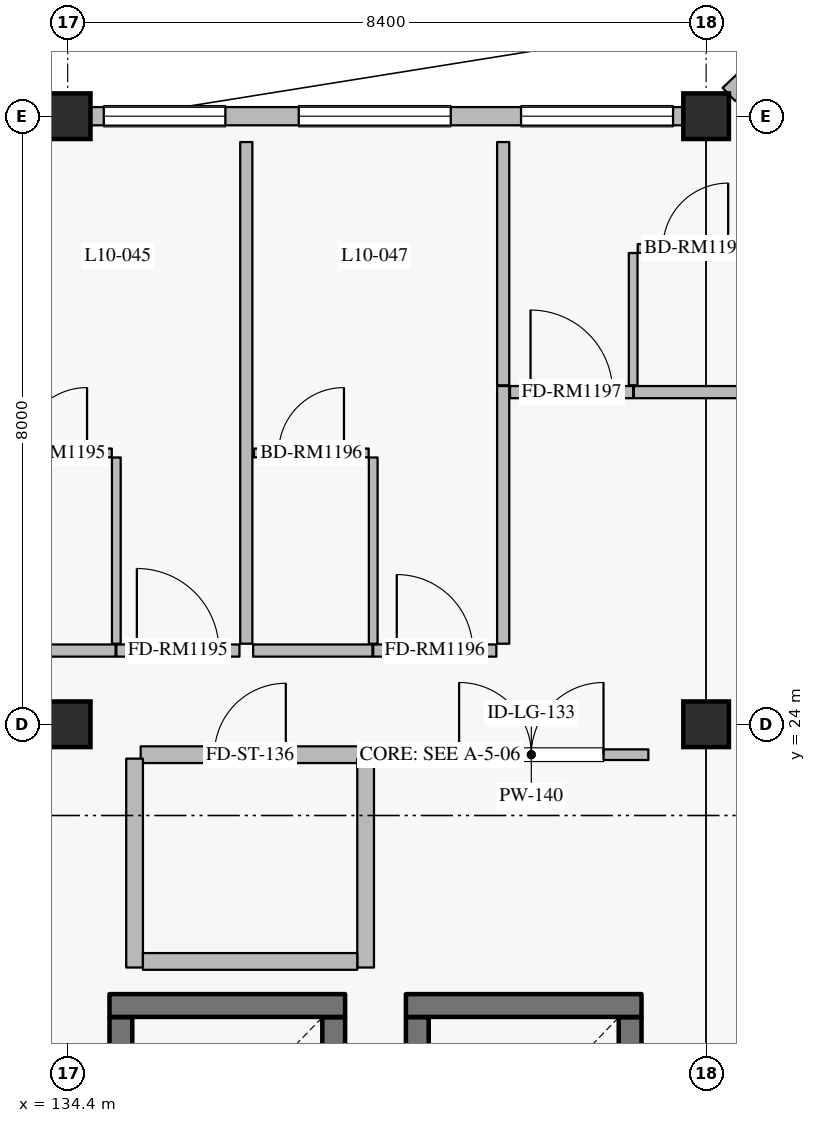
"""IFC4 building model, lengths in metres.
Left out: names, types, materials, properties, quantities, classifications, styles, units other than length and angle.
Written with IfcOpenShell. Run it as: python <this file> out.ifc"""

import sys

from ifc_helpers import new_model, si_unit, direction, frame, frame_2d, origin, origin_2d, place, context, subcontext, project, spatial, rectangle, extrude, element, fill, save


model = new_model("IFC4")
c1 = context("Model", 3, precision=1e-05, world=origin(), true_north=direction((0.0, 1.0)))
c2 = subcontext(c1, "Body", "Model", "MODEL_VIEW")
j1 = project(units=[si_unit("LENGTHUNIT", "METRE"), si_unit("PLANEANGLEUNIT", "RADIAN")], contexts=[c1])
p1 = place(None, origin())
s1 = spatial("IfcSite", under=j1, at=p1, CompositionType="ELEMENT")
p2 = place(p1, origin())
s2 = spatial("IfcBuilding", under=s1, at=p2, CompositionType="ELEMENT")
p3 = place(p2, frame((0.0, 0.0, 43.2)))
s3 = spatial("IfcBuildingStorey", under=s2, at=p3, CompositionType="ELEMENT", Elevation=43.2)
for number, where, z_axis, x_axis in (
    (1, (134.4, 32.0, 0.0), (0.0, 0.0, 1.0), (1.0, 0.0, 0.0)),
    (2, (142.8, 32.0, 0.0), (0.0, 0.0, 1.0), (1.0, 0.0, 0.0)),
    (3, (134.4, 24.0, 0.0), (0.0, 0.0, 1.0), (1.0, 0.0, 0.0)),
    (4, (142.8, 24.0, 0.0), (0.0, 0.0, 1.0), (1.0, 0.0, 0.0)),
):
    element("IfcColumn", number, at=place(p3, frame(where, z_axis=z_axis, x_axis=x_axis)), inside=s3, PredefinedType="COLUMN", context=c2, shape_type="SweptSolid", body=[
        extrude(rectangle(XDim=0.6, YDim=0.6, at=origin_2d()), origin(), (0.0, 0.0, 1.0), 4.2),
    ])
p4 = place(p3, frame((134.7, 32.0, 0.0), z_axis=(0.0, 0.0, 1.0), x_axis=(1.0, 0.0, 0.0)))
e5 = element("IfcWall", 5, at=p4, inside=s3, PredefinedType="SOLIDWALL", context=c2, shape_type="SweptSolid", body=[
    extrude(rectangle(XDim=7.8, YDim=0.24, at=frame_2d((3.9, 0.0))), origin(), (0.0, 0.0, 1.0), 3.54),
])
p5 = place(p4, frame((0.175, 0.0, 0.8)))
e6 = element("IfcOpeningElement", 6, at=p5, cuts=e5, PredefinedType="OPENING", context=c2, shape_type="SweptSolid", body=[
    extrude(rectangle(XDim=1.6, YDim=1.6, at=frame_2d((0.8, 0.8))), frame((0.0, 0.13, 0.0), z_axis=(0.0, -1.0, 0.0), x_axis=(1.0, 0.0, 0.0)), (0.0, 0.0, 1.0), 0.26),
])
p6 = place(p4, frame((2.74, 0.0, 0.8)))
e7 = element("IfcOpeningElement", 7, at=p6, cuts=e5, PredefinedType="OPENING", context=c2, shape_type="SweptSolid", body=[
    extrude(rectangle(XDim=2.0, YDim=1.75, at=frame_2d((1.0, 0.875))), frame((0.0, 0.13, 0.0), z_axis=(0.0, -1.0, 0.0), x_axis=(1.0, 0.0, 0.0)), (0.0, 0.0, 1.0), 0.26),
])
p7 = place(p4, frame((5.665, 0.0, 0.8)))
e8 = element("IfcOpeningElement", 8, at=p7, cuts=e5, PredefinedType="OPENING", context=c2, shape_type="SweptSolid", body=[
    extrude(rectangle(XDim=2.0, YDim=1.75, at=frame_2d((1.0, 0.875))), frame((0.0, 0.13, 0.0), z_axis=(0.0, -1.0, 0.0), x_axis=(1.0, 0.0, 0.0)), (0.0, 0.0, 1.0), 0.26),
])
p8 = place(p3, frame((143.1, 32.286, 0.0), z_axis=(0.0, 0.0, 1.0), x_axis=(0.724145477467, 0.689647248573, 0.0)))
e9 = element("IfcWall", 9, at=p8, inside=s3, PredefinedType="SOLIDWALL", context=c2, shape_type="SweptSolid", body=[
    extrude(rectangle(XDim=10.771, YDim=0.24, at=frame_2d((5.385, 0.0))), origin(), (0.0, 0.0, 1.0), 3.54),
])
p9 = place(p8, frame((1.914, 0.0, 0.8)))
e10 = element("IfcOpeningElement", 10, at=p9, cuts=e9, PredefinedType="OPENING", context=c2, shape_type="SweptSolid", body=[
    extrude(rectangle(XDim=2.0, YDim=1.75, at=frame_2d((1.0, 0.875))), frame((0.0, 0.13, 0.0), z_axis=(0.0, -1.0, 0.0), x_axis=(1.0, 0.0, 0.0)), (0.0, 0.0, 1.0), 0.26),
])
p10 = place(p8, frame((6.581, 0.0, 0.8)))
e11 = element("IfcOpeningElement", 11, at=p10, cuts=e9, PredefinedType="OPENING", context=c2, shape_type="SweptSolid", body=[
    extrude(rectangle(XDim=2.0, YDim=1.75, at=frame_2d((1.0, 0.875))), frame((0.0, 0.13, 0.0), z_axis=(0.0, -1.0, 0.0), x_axis=(1.0, 0.0, 0.0)), (0.0, 0.0, 1.0), 0.26),
])
p11 = place(p3, frame((137.9, 17.555, 0.0), z_axis=(0.0, 0.0, 1.0), x_axis=(0.0, 1.0, 0.0)))
e12 = element("IfcWall", 12, at=p11, inside=s3, PredefinedType="SHEAR", context=c2, shape_type="SweptSolid", body=[
    extrude(rectangle(XDim=2.59, YDim=0.3, at=frame_2d((1.295, 0.0))), origin(), (0.0, 0.0, 1.0), 3.935),
])
p12 = place(p3, frame((138.05, 20.3, 0.0), z_axis=(0.0, 0.0, 1.0), x_axis=(-1.0, 0.0, 0.0)))
e13 = element("IfcWall", 13, at=p12, inside=s3, PredefinedType="SHEAR", context=c2, shape_type="SweptSolid", body=[
    extrude(rectangle(XDim=3.1, YDim=0.3, at=frame_2d((1.55, 0.0))), origin(), (0.0, 0.0, 1.0), 3.935),
])
for number, where, z_axis, x_axis in (
    (14, (135.1, 20.145, 0.0), (0.0, 0.0, 1.0), (0.0, -1.0, 0.0)),
    (15, (141.8, 17.555, 0.0), (0.0, 0.0, 1.0), (0.0, 1.0, 0.0)),
):
    element("IfcWall", number, at=place(p3, frame(where, z_axis=z_axis, x_axis=x_axis)), inside=s3, PredefinedType="SHEAR", context=c2, shape_type="SweptSolid", body=[
        extrude(rectangle(XDim=2.59, YDim=0.3, at=frame_2d((1.295, 0.0))), origin(), (0.0, 0.0, 1.0), 3.935),
    ])
p13 = place(p3, frame((141.95, 20.3, 0.0), z_axis=(0.0, 0.0, 1.0), x_axis=(-1.0, 0.0, 0.0)))
e16 = element("IfcWall", 16, at=p13, inside=s3, PredefinedType="SHEAR", context=c2, shape_type="SweptSolid", body=[
    extrude(rectangle(XDim=3.1, YDim=0.3, at=frame_2d((1.55, 0.0))), origin(), (0.0, 0.0, 1.0), 3.935),
])
p14 = place(p3, frame((139.0, 20.145, 0.0), z_axis=(0.0, 0.0, 1.0), x_axis=(0.0, -1.0, 0.0)))
e17 = element("IfcWall", 17, at=p14, inside=s3, PredefinedType="SHEAR", context=c2, shape_type="SweptSolid", body=[
    extrude(rectangle(XDim=2.59, YDim=0.3, at=frame_2d((1.295, 0.0))), origin(), (0.0, 0.0, 1.0), 3.935),
])
p15 = place(p3, frame((133.46, 24.97, 0.0), z_axis=(0.0, 0.0, 1.0), x_axis=(1.0, 0.0, 0.0)))
e18 = element("IfcWall", 18, at=p15, inside=s3, PredefinedType="PARTITIONING", context=c2, shape_type="SweptSolid", body=[
    extrude(rectangle(XDim=1.57, YDim=0.16, at=frame_2d((0.785, 0.0))), origin(), (0.0, 0.0, 1.0), 3.935),
])
p16 = place(p3, frame((135.04, 24.97, 0.0), z_axis=(0.0, 0.0, 1.0), x_axis=(1.0, 0.0, 0.0)))
e19 = element("IfcWall", 19, at=p16, inside=s3, PredefinedType="PARTITIONING", context=c2, shape_type="SweptSolid", body=[
    extrude(rectangle(XDim=1.62, YDim=0.16, at=frame_2d((0.81, 0.0))), origin(), (0.0, 0.0, 1.0), 3.935),
])
p17 = place(p16, frame((0.27, 0.0, 0.0)))
e20 = element("IfcOpeningElement", 20, at=p17, cuts=e19, PredefinedType="OPENING", context=c2, shape_type="SweptSolid", body=[
    extrude(rectangle(XDim=1.08, YDim=2.3, at=frame_2d((0.54, 1.15))), frame((0.0, 0.09, 0.0), z_axis=(0.0, -1.0, 0.0), x_axis=(1.0, 0.0, 0.0)), (0.0, 0.0, 1.0), 0.18),
])
p18 = place(p3, frame((135.04, 25.06, 0.0), z_axis=(0.0, 0.0, 1.0), x_axis=(0.0, 1.0, 0.0)))
e21 = element("IfcWall", 21, at=p18, inside=s3, PredefinedType="PARTITIONING", context=c2, shape_type="SweptSolid", body=[
    extrude(rectangle(XDim=2.45, YDim=0.115, at=frame_2d((1.225, 0.0))), origin(), (0.0, 0.0, 1.0), 3.935),
])
p19 = place(p3, frame((133.47, 27.57, 0.0), z_axis=(0.0, 0.0, 1.0), x_axis=(1.0, 0.0, 0.0)))
e22 = element("IfcWall", 22, at=p19, inside=s3, PredefinedType="PARTITIONING", context=c2, shape_type="SweptSolid", body=[
    extrude(rectangle(XDim=1.51, YDim=0.115, at=frame_2d((0.755, 0.0))), origin(), (0.0, 0.0, 1.0), 3.935),
])
p20 = place(p19, frame((0.325, 0.0, 0.0)))
e23 = element("IfcOpeningElement", 23, at=p20, cuts=e22, PredefinedType="OPENING", context=c2, shape_type="SweptSolid", body=[
    extrude(rectangle(XDim=0.86, YDim=2.12, at=frame_2d((0.43, 1.06))), frame((0.0, 0.067, 0.0), z_axis=(0.0, -1.0, 0.0), x_axis=(1.0, 0.0, 0.0)), (0.0, 0.0, 1.0), 0.135),
])
p21 = place(p3, frame((136.84, 24.97, 0.0), z_axis=(0.0, 0.0, 1.0), x_axis=(1.0, 0.0, 0.0)))
e24 = element("IfcWall", 24, at=p21, inside=s3, PredefinedType="PARTITIONING", context=c2, shape_type="SweptSolid", body=[
    extrude(rectangle(XDim=1.57, YDim=0.16, at=frame_2d((0.785, 0.0))), origin(), (0.0, 0.0, 1.0), 3.935),
])
p22 = place(p3, frame((138.42, 24.97, 0.0), z_axis=(0.0, 0.0, 1.0), x_axis=(1.0, 0.0, 0.0)))
e25 = element("IfcWall", 25, at=p22, inside=s3, PredefinedType="PARTITIONING", context=c2, shape_type="SweptSolid", body=[
    extrude(rectangle(XDim=1.62, YDim=0.16, at=frame_2d((0.81, 0.0))), origin(), (0.0, 0.0, 1.0), 3.935),
])
p23 = place(p22, frame((0.31, 0.0, 0.0)))
e26 = element("IfcOpeningElement", 26, at=p23, cuts=e25, PredefinedType="OPENING", context=c2, shape_type="SweptSolid", body=[
    extrude(rectangle(XDim=1.0, YDim=2.25, at=frame_2d((0.5, 1.125))), frame((0.0, 0.09, 0.0), z_axis=(0.0, -1.0, 0.0), x_axis=(1.0, 0.0, 0.0)), (0.0, 0.0, 1.0), 0.18),
])
p24 = place(p3, frame((138.42, 25.06, 0.0), z_axis=(0.0, 0.0, 1.0), x_axis=(0.0, 1.0, 0.0)))
e27 = element("IfcWall", 27, at=p24, inside=s3, PredefinedType="PARTITIONING", context=c2, shape_type="SweptSolid", body=[
    extrude(rectangle(XDim=2.45, YDim=0.115, at=frame_2d((1.225, 0.0))), origin(), (0.0, 0.0, 1.0), 3.935),
])
p25 = place(p3, frame((136.85, 27.57, 0.0), z_axis=(0.0, 0.0, 1.0), x_axis=(1.0, 0.0, 0.0)))
e28 = element("IfcWall", 28, at=p25, inside=s3, PredefinedType="PARTITIONING", context=c2, shape_type="SweptSolid", body=[
    extrude(rectangle(XDim=1.51, YDim=0.115, at=frame_2d((0.755, 0.0))), origin(), (0.0, 0.0, 1.0), 3.935),
])
p26 = place(p25, frame((0.325, 0.0, 0.0)))
e29 = element("IfcOpeningElement", 29, at=p26, cuts=e28, PredefinedType="OPENING", context=c2, shape_type="SweptSolid", body=[
    extrude(rectangle(XDim=0.86, YDim=2.12, at=frame_2d((0.43, 1.06))), frame((0.0, 0.067, 0.0), z_axis=(0.0, -1.0, 0.0), x_axis=(1.0, 0.0, 0.0)), (0.0, 0.0, 1.0), 0.135),
])
p27 = place(p3, frame((136.75, 25.06, 0.0), z_axis=(0.0, 0.0, 1.0), x_axis=(0.0, 1.0, 0.0)))
e30 = element("IfcWall", 30, at=p27, inside=s3, PredefinedType="PARTITIONING", context=c2, shape_type="SweptSolid", body=[
    extrude(rectangle(XDim=6.6, YDim=0.16, at=frame_2d((3.3, 0.0))), origin(), (0.0, 0.0, 1.0), 3.935),
])
p28 = place(p3, frame((140.13, 25.06, 0.0), z_axis=(0.0, 0.0, 1.0), x_axis=(0.0, 1.0, 0.0)))
e31 = element("IfcWall", 31, at=p28, inside=s3, PredefinedType="PARTITIONING", context=c2, shape_type="SweptSolid", body=[
    extrude(rectangle(XDim=3.39, YDim=0.16, at=frame_2d((1.695, 0.0))), origin(), (0.0, 0.0, 1.0), 3.935),
])
p29 = place(p3, frame((140.22, 28.37, 0.0), z_axis=(0.0, 0.0, 1.0), x_axis=(1.0, 0.0, 0.0)))
e32 = element("IfcWall", 32, at=p29, inside=s3, PredefinedType="PARTITIONING", context=c2, shape_type="SweptSolid", body=[
    extrude(rectangle(XDim=1.62, YDim=0.16, at=frame_2d((0.81, 0.0))), origin(), (0.0, 0.0, 1.0), 3.935),
])
p30 = place(p29, frame((0.27, 0.0, 0.0)))
e33 = element("IfcOpeningElement", 33, at=p30, cuts=e32, PredefinedType="OPENING", context=c2, shape_type="SweptSolid", body=[
    extrude(rectangle(XDim=1.08, YDim=2.3, at=frame_2d((0.54, 1.15))), frame((0.0, 0.09, 0.0), z_axis=(0.0, -1.0, 0.0), x_axis=(1.0, 0.0, 0.0)), (0.0, 0.0, 1.0), 0.18),
])
p31 = place(p3, frame((141.85, 28.37, 0.0), z_axis=(0.0, 0.0, 1.0), x_axis=(1.0, 0.0, 0.0)))
e34 = element("IfcWall", 34, at=p31, inside=s3, PredefinedType="PARTITIONING", context=c2, shape_type="SweptSolid", body=[
    extrude(rectangle(XDim=1.58, YDim=0.16, at=frame_2d((0.79, 0.0))), origin(), (0.0, 0.0, 1.0), 3.935),
])
p32 = place(p3, frame((141.84, 28.46, 0.0), z_axis=(0.0, 0.0, 1.0), x_axis=(0.0, 1.0, 0.0)))
e35 = element("IfcWall", 35, at=p32, inside=s3, PredefinedType="PARTITIONING", context=c2, shape_type="SweptSolid", body=[
    extrude(rectangle(XDim=1.74, YDim=0.115, at=frame_2d((0.87, 0.0))), origin(), (0.0, 0.0, 1.0), 3.935),
])
p33 = place(p3, frame((141.9, 30.26, 0.0), z_axis=(0.0, 0.0, 1.0), x_axis=(1.0, 0.0, 0.0)))
e36 = element("IfcWall", 36, at=p33, inside=s3, PredefinedType="PARTITIONING", context=c2, shape_type="SweptSolid", body=[
    extrude(rectangle(XDim=1.52, YDim=0.115, at=frame_2d((0.76, 0.0))), origin(), (0.0, 0.0, 1.0), 3.935),
])
p34 = place(p33, frame((0.33, 0.0, 0.0)))
e37 = element("IfcOpeningElement", 37, at=p34, cuts=e36, PredefinedType="OPENING", context=c2, shape_type="SweptSolid", body=[
    extrude(rectangle(XDim=0.86, YDim=2.12, at=frame_2d((0.43, 1.06))), frame((0.0, 0.067, 0.0), z_axis=(0.0, -1.0, 0.0), x_axis=(1.0, 0.0, 0.0)), (0.0, 0.0, 1.0), 0.135),
])
p35 = place(p3, frame((140.13, 28.46, 0.0), z_axis=(0.0, 0.0, 1.0), x_axis=(0.0, 1.0, 0.0)))
e38 = element("IfcWall", 38, at=p35, inside=s3, PredefinedType="PARTITIONING", context=c2, shape_type="SweptSolid", body=[
    extrude(rectangle(XDim=3.2, YDim=0.16, at=frame_2d((1.6, 0.0))), origin(), (0.0, 0.0, 1.0), 3.935),
])
p36 = place(p3, frame((138.96, 23.6, 0.0), z_axis=(0.0, 0.0, 1.0), x_axis=(1.0, 0.0, 0.0)))
e39 = element("IfcWall", 39, at=p36, inside=s3, PredefinedType="PARTITIONING", context=c2, shape_type="SweptSolid", body=[
    extrude(rectangle(XDim=3.08, YDim=0.14, at=frame_2d((1.54, 0.0))), origin(), (0.0, 0.0, 1.0), 3.935),
])
p37 = place(p36, frame((0.59, 0.0, 0.0)))
e40 = element("IfcOpeningElement", 40, at=p37, cuts=e39, PredefinedType="OPENING", context=c2, shape_type="SweptSolid", body=[
    extrude(rectangle(XDim=1.9, YDim=2.4, at=frame_2d((0.95, 1.2))), frame((0.0, 0.08, 0.0), z_axis=(0.0, -1.0, 0.0), x_axis=(1.0, 0.0, 0.0)), (0.0, 0.0, 1.0), 0.16),
])
p38 = place(p3, frame((135.36, 23.6, 0.0), z_axis=(0.0, 0.0, 1.0), x_axis=(1.0, 0.0, 0.0)))
e41 = element("IfcWall", 41, at=p38, inside=s3, PredefinedType="PARTITIONING", context=c2, shape_type="SweptSolid", body=[
    extrude(rectangle(XDim=2.88, YDim=0.22, at=frame_2d((1.44, 0.0))), origin(), (0.0, 0.0, 1.0), 3.935),
])
p39 = place(p38, frame((0.97, 0.0, 0.0)))
e42 = element("IfcOpeningElement", 42, at=p39, cuts=e41, PredefinedType="OPENING", context=c2, shape_type="SweptSolid", body=[
    extrude(rectangle(XDim=0.94, YDim=2.15, at=frame_2d((0.47, 1.075))), frame((0.0, 0.12, 0.0), z_axis=(0.0, -1.0, 0.0), x_axis=(1.0, 0.0, 0.0)), (0.0, 0.0, 1.0), 0.24),
])
for number, where, z_axis, x_axis in (
    (43, (135.28, 20.8, 0.0), (0.0, 0.0, 1.0), (0.0, 1.0, 0.0)),
    (44, (138.32, 20.8, 0.0), (0.0, 0.0, 1.0), (0.0, 1.0, 0.0)),
):
    element("IfcWall", number, at=place(p3, frame(where, z_axis=z_axis, x_axis=x_axis)), inside=s3, PredefinedType="PARTITIONING", context=c2, shape_type="SweptSolid", body=[
        extrude(rectangle(XDim=2.748, YDim=0.22, at=frame_2d((1.374, 0.0))), origin(), (0.0, 0.0, 1.0), 3.935),
    ])
p40 = place(p3, frame((135.39, 20.88, 0.0), z_axis=(0.0, 0.0, 1.0), x_axis=(1.0, 0.0, 0.0)))
e45 = element("IfcWall", 45, at=p40, inside=s3, PredefinedType="PARTITIONING", context=c2, shape_type="SweptSolid", body=[
    extrude(rectangle(XDim=2.82, YDim=0.22, at=frame_2d((1.41, 0.0))), origin(), (0.0, 0.0, 1.0), 3.935),
])
p41 = place(p5, origin())
e46 = element("IfcWindow", 46, at=p41, inside=s3, PartitioningType="SINGLE_PANEL", PredefinedType="WINDOW", context=c2, shape_type="SweptSolid", body=[
    extrude(rectangle(XDim=1.6, YDim=1.6, at=frame_2d((0.8, 0.8))), frame((0.0, 0.03, 0.0), z_axis=(0.0, -1.0, 0.0), x_axis=(1.0, 0.0, 0.0)), (0.0, 0.0, 1.0), 0.06),
])
fill(e6, e46)
p42 = place(p6, origin())
e47 = element("IfcWindow", 47, at=p42, inside=s3, PartitioningType="DOUBLE_PANEL_VERTICAL", PredefinedType="WINDOW", context=c2, shape_type="SweptSolid", body=[
    extrude(rectangle(XDim=2.0, YDim=1.75, at=frame_2d((1.0, 0.875))), frame((0.0, 0.03, 0.0), z_axis=(0.0, -1.0, 0.0), x_axis=(1.0, 0.0, 0.0)), (0.0, 0.0, 1.0), 0.06),
])
fill(e7, e47)
p43 = place(p7, origin())
e48 = element("IfcWindow", 48, at=p43, inside=s3, PartitioningType="DOUBLE_PANEL_VERTICAL", PredefinedType="WINDOW", context=c2, shape_type="SweptSolid", body=[
    extrude(rectangle(XDim=2.0, YDim=1.75, at=frame_2d((1.0, 0.875))), frame((0.0, 0.03, 0.0), z_axis=(0.0, -1.0, 0.0), x_axis=(1.0, 0.0, 0.0)), (0.0, 0.0, 1.0), 0.06),
])
fill(e8, e48)
p44 = place(p17, origin())
e49 = element("IfcDoor", 49, at=p44, inside=s3, OperationType="SINGLE_SWING_LEFT", PredefinedType="DOOR", context=c2, shape_type="SweptSolid", body=[
    extrude(rectangle(XDim=1.08, YDim=2.3, at=frame_2d((0.54, 1.15))), frame((0.0, 0.025, 0.0), z_axis=(0.0, -1.0, 0.0), x_axis=(1.0, 0.0, 0.0)), (0.0, 0.0, 1.0), 0.05),
])
fill(e20, e49)
p45 = place(p20, origin())
e50 = element("IfcDoor", 50, at=p45, inside=s3, OperationType="SINGLE_SWING_RIGHT", PredefinedType="DOOR", context=c2, shape_type="SweptSolid", body=[
    extrude(rectangle(XDim=0.86, YDim=2.12, at=frame_2d((0.43, 1.06))), frame((0.0, 0.025, 0.0), z_axis=(0.0, -1.0, 0.0), x_axis=(1.0, 0.0, 0.0)), (0.0, 0.0, 1.0), 0.05),
])
fill(e23, e50)
p46 = place(p23, origin())
e51 = element("IfcDoor", 51, at=p46, inside=s3, OperationType="SINGLE_SWING_LEFT", PredefinedType="DOOR", context=c2, shape_type="SweptSolid", body=[
    extrude(rectangle(XDim=1.0, YDim=2.25, at=frame_2d((0.5, 1.125))), frame((0.0, 0.025, 0.0), z_axis=(0.0, -1.0, 0.0), x_axis=(1.0, 0.0, 0.0)), (0.0, 0.0, 1.0), 0.05),
])
fill(e26, e51)
p47 = place(p26, origin())
e52 = element("IfcDoor", 52, at=p47, inside=s3, OperationType="SINGLE_SWING_RIGHT", PredefinedType="DOOR", context=c2, shape_type="SweptSolid", body=[
    extrude(rectangle(XDim=0.86, YDim=2.12, at=frame_2d((0.43, 1.06))), frame((0.0, 0.025, 0.0), z_axis=(0.0, -1.0, 0.0), x_axis=(1.0, 0.0, 0.0)), (0.0, 0.0, 1.0), 0.05),
])
fill(e29, e52)
p48 = place(p30, origin())
e53 = element("IfcDoor", 53, at=p48, inside=s3, OperationType="SINGLE_SWING_LEFT", PredefinedType="DOOR", context=c2, shape_type="SweptSolid", body=[
    extrude(rectangle(XDim=1.08, YDim=2.3, at=frame_2d((0.54, 1.15))), frame((0.0, 0.025, 0.0), z_axis=(0.0, -1.0, 0.0), x_axis=(1.0, 0.0, 0.0)), (0.0, 0.0, 1.0), 0.05),
])
fill(e33, e53)
p49 = place(p34, origin())
e54 = element("IfcDoor", 54, at=p49, inside=s3, OperationType="SINGLE_SWING_RIGHT", PredefinedType="DOOR", context=c2, shape_type="SweptSolid", body=[
    extrude(rectangle(XDim=0.86, YDim=2.12, at=frame_2d((0.43, 1.06))), frame((0.0, 0.025, 0.0), z_axis=(0.0, -1.0, 0.0), x_axis=(1.0, 0.0, 0.0)), (0.0, 0.0, 1.0), 0.05),
])
fill(e37, e54)
p50 = place(p37, origin())
e55 = element("IfcDoor", 55, at=p50, inside=s3, OperationType="DOUBLE_DOOR_SINGLE_SWING", PredefinedType="DOOR", context=c2, shape_type="SweptSolid", body=[
    extrude(rectangle(XDim=1.9, YDim=2.4, at=frame_2d((0.95, 1.2))), frame((0.0, 0.025, 0.0), z_axis=(0.0, -1.0, 0.0), x_axis=(1.0, 0.0, 0.0)), (0.0, 0.0, 1.0), 0.05),
])
fill(e40, e55)
p51 = place(p39, origin())
e56 = element("IfcDoor", 56, at=p51, inside=s3, OperationType="SINGLE_SWING_RIGHT", PredefinedType="DOOR", context=c2, shape_type="SweptSolid", body=[
    extrude(rectangle(XDim=0.94, YDim=2.15, at=frame_2d((0.47, 1.075))), frame((0.0, 0.025, 0.0), z_axis=(0.0, -1.0, 0.0), x_axis=(1.0, 0.0, 0.0)), (0.0, 0.0, 1.0), 0.05),
])
fill(e42, e56)
save(model, sys.argv[1])
